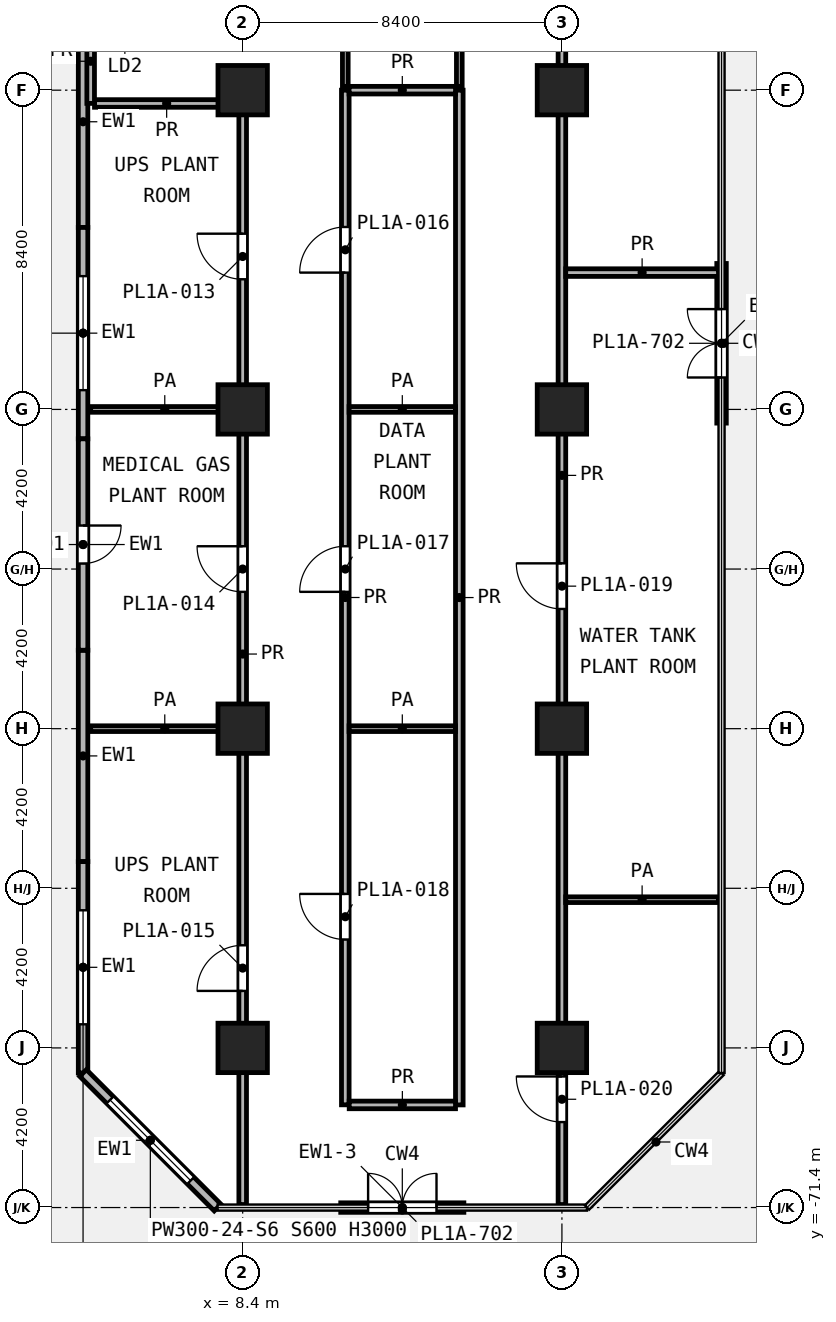
"""IFC4 building model, lengths in metres.
Left out: names, types, materials, properties, quantities, classifications, styles, units other than length and angle.
Written with IfcOpenShell. Run it as: python <this file> out.ifc"""

import sys

from ifc_helpers import new_model, si_unit, direction, frame, frame_2d, origin, origin_2d, place, context, subcontext, project, spatial, rectangle, extrude, element, fill, save


model = new_model("IFC4")
c1 = context("Model", 3, precision=1e-05, world=origin(), true_north=direction((0.0, 1.0)))
c2 = subcontext(c1, "Body", "Model", "MODEL_VIEW")
j1 = project(units=[si_unit("LENGTHUNIT", "METRE"), si_unit("PLANEANGLEUNIT", "RADIAN")], contexts=[c1])
p1 = place(None, origin())
s1 = spatial("IfcSite", under=j1, at=p1, CompositionType="ELEMENT")
p2 = place(p1, origin())
s2 = spatial("IfcBuilding", under=s1, at=p2, CompositionType="ELEMENT")
p3 = place(p2, frame((0.0, 0.0, 34.2)))
s3 = spatial("IfcBuildingStorey", under=s2, at=p3, CompositionType="ELEMENT", Elevation=34.2)
for number, where, z_axis, x_axis in (
    (1, (8.4, -42.0, 0.0), (0.0, 0.0, 1.0), (1.0, 0.0, 0.0)),
    (2, (16.8, -42.0, 0.0), (0.0, 0.0, 1.0), (1.0, 0.0, 0.0)),
    (3, (8.4, -50.4, 0.0), (0.0, 0.0, 1.0), (1.0, 0.0, 0.0)),
    (4, (16.8, -50.4, 0.0), (0.0, 0.0, 1.0), (1.0, 0.0, 0.0)),
    (5, (8.4, -58.8, 0.0), (0.0, 0.0, 1.0), (1.0, 0.0, 0.0)),
    (6, (16.8, -58.8, 0.0), (0.0, 0.0, 1.0), (1.0, 0.0, 0.0)),
    (7, (8.4, -67.2, 0.0), (0.0, 0.0, 1.0), (1.0, 0.0, 0.0)),
    (8, (16.8, -67.2, 0.0), (0.0, 0.0, 1.0), (1.0, 0.0, 0.0)),
):
    element("IfcColumn", number, at=place(p3, frame(where, z_axis=z_axis, x_axis=x_axis)), inside=s3, PredefinedType="COLUMN", context=c2, shape_type="SweptSolid", body=[
        extrude(rectangle(XDim=1.3, YDim=1.3, at=origin_2d()), origin(), (0.0, 0.0, 1.0), 5.0),
    ])
p4 = place(p3, frame((4.2, -40.05, 0.0), z_axis=(0.0, 0.0, 1.0), x_axis=(0.0, -1.0, 0.0)))
e9 = element("IfcWall", 9, at=p4, inside=s3, PredefinedType="SOLIDWALL", context=c2, shape_type="SweptSolid", body=[
    extrude(rectangle(XDim=5.562, YDim=0.25, at=frame_2d((2.781, 0.0))), origin(), (0.0, 0.0, 1.0), 4.58),
])
p5 = place(p3, frame((4.2, -45.612, 0.0), z_axis=(0.0, 0.0, 1.0), x_axis=(0.0, -1.0, 0.0)))
e10 = element("IfcWall", 10, at=p5, inside=s3, PredefinedType="SOLIDWALL", context=c2, shape_type="SweptSolid", body=[
    extrude(rectangle(XDim=5.562, YDim=0.25, at=frame_2d((2.781, 0.0))), origin(), (0.0, 0.0, 1.0), 4.58),
])
p6 = place(p5, frame((1.281, 0.0, 0.6)))
e11 = element("IfcOpeningElement", 11, at=p6, cuts=e10, PredefinedType="OPENING", context=c2, shape_type="SweptSolid", body=[
    extrude(rectangle(XDim=3.0, YDim=2.4, at=frame_2d((1.5, 1.2))), frame((0.0, 0.135, 0.0), z_axis=(0.0, -1.0, 0.0), x_axis=(1.0, 0.0, 0.0)), (0.0, 0.0, 1.0), 0.27),
])
p7 = place(p3, frame((4.2, -51.174, 0.0), z_axis=(0.0, 0.0, 1.0), x_axis=(0.0, -1.0, 0.0)))
e12 = element("IfcWall", 12, at=p7, inside=s3, PredefinedType="SOLIDWALL", context=c2, shape_type="SweptSolid", body=[
    extrude(rectangle(XDim=5.562, YDim=0.25, at=frame_2d((2.781, 0.0))), origin(), (0.0, 0.0, 1.0), 4.58),
])
p8 = place(p7, frame((2.281, 0.0, 0.0)))
e13 = element("IfcOpeningElement", 13, at=p8, cuts=e12, PredefinedType="OPENING", context=c2, shape_type="SweptSolid", body=[
    extrude(rectangle(XDim=1.0, YDim=2.1, at=frame_2d((0.5, 1.05))), frame((0.0, 0.135, 0.0), z_axis=(0.0, -1.0, 0.0), x_axis=(1.0, 0.0, 0.0)), (0.0, 0.0, 1.0), 0.27),
])
p9 = place(p3, frame((4.2, -56.736, 0.0), z_axis=(0.0, 0.0, 1.0), x_axis=(0.0, -1.0, 0.0)))
e14 = element("IfcWall", 14, at=p9, inside=s3, PredefinedType="SOLIDWALL", context=c2, shape_type="SweptSolid", body=[
    extrude(rectangle(XDim=5.562, YDim=0.25, at=frame_2d((2.781, 0.0))), origin(), (0.0, 0.0, 1.0), 4.58),
])
p10 = place(p3, frame((4.2, -62.298, 0.0), z_axis=(0.0, 0.0, 1.0), x_axis=(0.0, -1.0, 0.0)))
e15 = element("IfcWall", 15, at=p10, inside=s3, PredefinedType="SOLIDWALL", context=c2, shape_type="SweptSolid", body=[
    extrude(rectangle(XDim=5.562, YDim=0.25, at=frame_2d((2.781, 0.0))), origin(), (0.0, 0.0, 1.0), 4.58),
])
p11 = place(p10, frame((1.281, 0.0, 0.6)))
e16 = element("IfcOpeningElement", 16, at=p11, cuts=e15, PredefinedType="OPENING", context=c2, shape_type="SweptSolid", body=[
    extrude(rectangle(XDim=3.0, YDim=2.4, at=frame_2d((1.5, 1.2))), frame((0.0, 0.135, 0.0), z_axis=(0.0, -1.0, 0.0), x_axis=(1.0, 0.0, 0.0)), (0.0, 0.0, 1.0), 0.27),
])
p12 = place(p3, frame((4.2, -67.86, 0.0), z_axis=(0.0, 0.0, 1.0), x_axis=(0.707131164599, -0.707082396933, 0.0)))
e17 = element("IfcWall", 17, at=p12, inside=s3, PredefinedType="SOLIDWALL", context=c2, shape_type="SweptSolid", body=[
    extrude(rectangle(XDim=5.006, YDim=0.25, at=frame_2d((2.503, 0.0))), origin(), (0.0, 0.0, 1.0), 4.58),
])
p13 = place(p12, frame((1.003, 0.0, 0.6)))
e18 = element("IfcOpeningElement", 18, at=p13, cuts=e17, PredefinedType="OPENING", context=c2, shape_type="SweptSolid", body=[
    extrude(rectangle(XDim=3.0, YDim=2.4, at=frame_2d((1.5, 1.2))), frame((0.0, 0.135, 0.0), z_axis=(0.0, -1.0, 0.0), x_axis=(1.0, 0.0, 0.0)), (0.0, 0.0, 1.0), 0.27),
])
p14 = place(p3, frame((10.98, -71.401, 0.0), z_axis=(0.0, 0.0, 1.0), x_axis=(1.0, 0.0, 0.0)))
e19 = element("IfcWall", 19, at=p14, inside=s3, PredefinedType="SOLIDWALL", context=c2, shape_type="SweptSolid", body=[
    extrude(rectangle(XDim=3.24, YDim=0.25, at=frame_2d((1.62, 0.0))), origin(), (0.0, 0.0, 1.0), 4.42),
])
p15 = place(p14, frame((0.72, 0.0, 0.0)))
e20 = element("IfcOpeningElement", 20, at=p15, cuts=e19, PredefinedType="OPENING", context=c2, shape_type="SweptSolid", body=[
    extrude(rectangle(XDim=1.8, YDim=2.1, at=frame_2d((0.9, 1.05))), frame((0.0, 0.135, 0.0), z_axis=(0.0, -1.0, 0.0), x_axis=(1.0, 0.0, 0.0)), (0.0, 0.0, 1.0), 0.27),
])
p16 = place(p3, frame((21.0, -50.76, 0.0), z_axis=(0.0, 0.0, 1.0), x_axis=(0.0, 1.0, 0.0)))
e21 = element("IfcWall", 21, at=p16, inside=s3, PredefinedType="SOLIDWALL", context=c2, shape_type="SweptSolid", body=[
    extrude(rectangle(XDim=4.2, YDim=0.25, at=frame_2d((2.1, 0.0))), origin(), (0.0, 0.0, 1.0), 4.42),
])
p17 = place(p16, frame((1.2, 0.0, 0.0)))
e22 = element("IfcOpeningElement", 22, at=p17, cuts=e21, PredefinedType="OPENING", context=c2, shape_type="SweptSolid", body=[
    extrude(rectangle(XDim=1.8, YDim=2.1, at=frame_2d((0.9, 1.05))), frame((0.0, 0.135, 0.0), z_axis=(0.0, -1.0, 0.0), x_axis=(1.0, 0.0, 0.0)), (0.0, 0.0, 1.0), 0.27),
])
p18 = place(p3, frame((16.9, -63.3, 0.0), z_axis=(0.0, 0.0, 1.0), x_axis=(1.0, 0.0, 0.0)))
e23 = element("IfcWall", 23, at=p18, inside=s3, PredefinedType="PARTITIONING", context=c2, shape_type="SweptSolid", body=[
    extrude(rectangle(XDim=4.02, YDim=0.15, at=frame_2d((2.01, 0.0))), origin(), (0.0, 0.0, 1.0), 4.58),
])
p19 = place(p3, frame((4.4, -58.8, 0.0), z_axis=(0.0, 0.0, 1.0), x_axis=(1.0, 0.0, 0.0)))
e24 = element("IfcWall", 24, at=p19, inside=s3, PredefinedType="PARTITIONING", context=c2, shape_type="SweptSolid", body=[
    extrude(rectangle(XDim=3.9, YDim=0.15, at=frame_2d((1.95, 0.0))), origin(), (0.0, 0.0, 1.0), 4.58),
])
p20 = place(p3, frame((11.2, -58.8, 0.0), z_axis=(0.0, 0.0, 1.0), x_axis=(1.0, 0.0, 0.0)))
e25 = element("IfcWall", 25, at=p20, inside=s3, PredefinedType="PARTITIONING", context=c2, shape_type="SweptSolid", body=[
    extrude(rectangle(XDim=2.8, YDim=0.15, at=frame_2d((1.4, 0.0))), origin(), (0.0, 0.0, 1.0), 4.58),
])
p21 = place(p3, frame((4.4, -50.4, 0.0), z_axis=(0.0, 0.0, 1.0), x_axis=(1.0, 0.0, 0.0)))
e26 = element("IfcWall", 26, at=p21, inside=s3, PredefinedType="PARTITIONING", context=c2, shape_type="SweptSolid", body=[
    extrude(rectangle(XDim=3.9, YDim=0.15, at=frame_2d((1.95, 0.0))), origin(), (0.0, 0.0, 1.0), 4.58),
])
p22 = place(p3, frame((11.2, -50.4, 0.0), z_axis=(0.0, 0.0, 1.0), x_axis=(1.0, 0.0, 0.0)))
e27 = element("IfcWall", 27, at=p22, inside=s3, PredefinedType="PARTITIONING", context=c2, shape_type="SweptSolid", body=[
    extrude(rectangle(XDim=2.8, YDim=0.15, at=frame_2d((1.4, 0.0))), origin(), (0.0, 0.0, 1.0), 4.58),
])
p23 = place(p3, frame((11.1, -41.9, 0.0), z_axis=(0.0, 0.0, 1.0), x_axis=(0.0, 1.0, 0.0)))
e28 = element("IfcWall", 28, at=p23, inside=s3, PredefinedType="PARTITIONING", context=c2, shape_type="SweptSolid", body=[
    extrude(rectangle(XDim=12.497, YDim=0.15, at=frame_2d((6.249, 0.0))), origin(), (0.0, 0.0, 1.0), 4.58),
])
p24 = place(p23, frame((5.699, 0.0, 0.0)))
e29 = element("IfcOpeningElement", 29, at=p24, cuts=e28, PredefinedType="OPENING", context=c2, shape_type="SweptSolid", body=[
    extrude(rectangle(XDim=1.0, YDim=2.1, at=frame_2d((0.5, 1.05))), frame((0.0, 0.085, 0.0), z_axis=(0.0, -1.0, 0.0), x_axis=(1.0, 0.0, 0.0)), (0.0, 0.0, 1.0), 0.17),
])
p25 = place(p3, frame((14.1, -41.9, 0.0), z_axis=(0.0, 0.0, 1.0), x_axis=(0.0, 1.0, 0.0)))
e30 = element("IfcWall", 30, at=p25, inside=s3, PredefinedType="PARTITIONING", context=c2, shape_type="SweptSolid", body=[
    extrude(rectangle(XDim=12.5, YDim=0.15, at=frame_2d((6.25, 0.0))), origin(), (0.0, 0.0, 1.0), 4.58),
])
p26 = place(p3, frame((11.203, -68.7, 0.0), z_axis=(0.0, 0.0, 1.0), x_axis=(1.0, 0.0, 0.0)))
e31 = element("IfcWall", 31, at=p26, inside=s3, PredefinedType="PARTITIONING", context=c2, shape_type="SweptSolid", body=[
    extrude(rectangle(XDim=2.797, YDim=0.2, at=frame_2d((1.398, 0.0))), origin(), (0.0, 0.0, 1.0), 4.58),
])
p27 = place(p3, frame((16.9, -46.8, 0.0), z_axis=(0.0, 0.0, 1.0), x_axis=(1.0, 0.0, 0.0)))
e32 = element("IfcWall", 32, at=p27, inside=s3, PredefinedType="PARTITIONING", context=c2, shape_type="SweptSolid", body=[
    extrude(rectangle(XDim=4.02, YDim=0.2, at=frame_2d((2.01, 0.0))), origin(), (0.0, 0.0, 1.0), 4.58),
])
p28 = place(p3, frame((4.501, -42.35, 0.0), z_axis=(0.0, 0.0, 1.0), x_axis=(1.0, 0.0, 0.0)))
e33 = element("IfcWall", 33, at=p28, inside=s3, PredefinedType="PARTITIONING", context=c2, shape_type="SweptSolid", body=[
    extrude(rectangle(XDim=3.797, YDim=0.2, at=frame_2d((1.898, 0.0))), origin(), (0.0, 0.0, 1.0), 4.58),
])
p29 = place(p3, frame((11.2, -42.0, 0.0), z_axis=(0.0, 0.0, 1.0), x_axis=(1.0, 0.0, 0.0)))
e34 = element("IfcWall", 34, at=p29, inside=s3, PredefinedType="PARTITIONING", context=c2, shape_type="SweptSolid", body=[
    extrude(rectangle(XDim=2.8, YDim=0.2, at=frame_2d((1.4, 0.0))), origin(), (0.0, 0.0, 1.0), 4.58),
])
p30 = place(p3, frame((4.4, -42.348, 0.0), z_axis=(0.0, 0.0, 1.0), x_axis=(0.0, 1.0, 0.0)))
e35 = element("IfcWall", 35, at=p30, inside=s3, PredefinedType="PARTITIONING", context=c2, shape_type="SweptSolid", body=[
    extrude(rectangle(XDim=2.218, YDim=0.2, at=frame_2d((1.109, 0.0))), origin(), (0.0, 0.0, 1.0), 4.58),
])
p31 = place(p3, frame((8.4, -71.321, 0.0), z_axis=(0.0, 0.0, 1.0), x_axis=(0.0, 1.0, 0.0)))
e36 = element("IfcWall", 36, at=p31, inside=s3, PredefinedType="PARTITIONING", context=c2, shape_type="SweptSolid", body=[
    extrude(rectangle(XDim=28.969, YDim=0.2, at=frame_2d((14.484, 0.0))), origin(), (0.0, 0.0, 1.0), 4.58),
])
p32 = place(p31, frame((24.345, 0.0, 0.0)))
e37 = element("IfcOpeningElement", 37, at=p32, cuts=e36, PredefinedType="OPENING", context=c2, shape_type="SweptSolid", body=[
    extrude(rectangle(XDim=1.2, YDim=2.1, at=frame_2d((0.6, 1.05))), frame((0.0, 0.11, 0.0), z_axis=(0.0, -1.0, 0.0), x_axis=(1.0, 0.0, 0.0)), (0.0, 0.0, 1.0), 0.22),
])
p33 = place(p31, frame((16.121, 0.0, 0.0)))
e38 = element("IfcOpeningElement", 38, at=p33, cuts=e36, PredefinedType="OPENING", context=c2, shape_type="SweptSolid", body=[
    extrude(rectangle(XDim=1.2, YDim=2.1, at=frame_2d((0.6, 1.05))), frame((0.0, 0.11, 0.0), z_axis=(0.0, -1.0, 0.0), x_axis=(1.0, 0.0, 0.0)), (0.0, 0.0, 1.0), 0.22),
])
p34 = place(p31, frame((5.621, 0.0, 0.0)))
e39 = element("IfcOpeningElement", 39, at=p34, cuts=e36, PredefinedType="OPENING", context=c2, shape_type="SweptSolid", body=[
    extrude(rectangle(XDim=1.2, YDim=2.1, at=frame_2d((0.6, 1.05))), frame((0.0, 0.11, 0.0), z_axis=(0.0, -1.0, 0.0), x_axis=(1.0, 0.0, 0.0)), (0.0, 0.0, 1.0), 0.22),
])
p35 = place(p3, frame((11.1, -68.697, 0.0), z_axis=(0.0, 0.0, 1.0), x_axis=(0.0, 1.0, 0.0)))
e40 = element("IfcWall", 40, at=p35, inside=s3, PredefinedType="PARTITIONING", context=c2, shape_type="SweptSolid", body=[
    extrude(rectangle(XDim=26.697, YDim=0.2, at=frame_2d((13.349, 0.0))), origin(), (0.0, 0.0, 1.0), 4.58),
])
p36 = place(p35, frame((21.897, 0.0, 0.0)))
e41 = element("IfcOpeningElement", 41, at=p36, cuts=e40, PredefinedType="OPENING", context=c2, shape_type="SweptSolid", body=[
    extrude(rectangle(XDim=1.2, YDim=2.1, at=frame_2d((0.6, 1.05))), frame((0.0, 0.11, 0.0), z_axis=(0.0, -1.0, 0.0), x_axis=(1.0, 0.0, 0.0)), (0.0, 0.0, 1.0), 0.22),
])
p37 = place(p35, frame((13.497, 0.0, 0.0)))
e42 = element("IfcOpeningElement", 42, at=p37, cuts=e40, PredefinedType="OPENING", context=c2, shape_type="SweptSolid", body=[
    extrude(rectangle(XDim=1.2, YDim=2.1, at=frame_2d((0.6, 1.05))), frame((0.0, 0.11, 0.0), z_axis=(0.0, -1.0, 0.0), x_axis=(1.0, 0.0, 0.0)), (0.0, 0.0, 1.0), 0.22),
])
p38 = place(p35, frame((4.349, 0.0, 0.0)))
e43 = element("IfcOpeningElement", 43, at=p38, cuts=e40, PredefinedType="OPENING", context=c2, shape_type="SweptSolid", body=[
    extrude(rectangle(XDim=1.2, YDim=2.1, at=frame_2d((0.6, 1.05))), frame((0.0, 0.11, 0.0), z_axis=(0.0, -1.0, 0.0), x_axis=(1.0, 0.0, 0.0)), (0.0, 0.0, 1.0), 0.22),
])
p39 = place(p3, frame((14.1, -68.7, 0.0), z_axis=(0.0, 0.0, 1.0), x_axis=(0.0, 1.0, 0.0)))
e44 = element("IfcWall", 44, at=p39, inside=s3, PredefinedType="PARTITIONING", context=c2, shape_type="SweptSolid", body=[
    extrude(rectangle(XDim=26.7, YDim=0.2, at=frame_2d((13.35, 0.0))), origin(), (0.0, 0.0, 1.0), 4.58),
])
p40 = place(p3, frame((16.8, -71.321, 0.0), z_axis=(0.0, 0.0, 1.0), x_axis=(0.0, 1.0, 0.0)))
e45 = element("IfcWall", 45, at=p40, inside=s3, PredefinedType="PARTITIONING", context=c2, shape_type="SweptSolid", body=[
    extrude(rectangle(XDim=38.371, YDim=0.2, at=frame_2d((19.186, 0.0))), origin(), (0.0, 0.0, 1.0), 4.58),
])
p41 = place(p40, frame((32.621, 0.0, 0.0)))
e46 = element("IfcOpeningElement", 46, at=p41, cuts=e45, PredefinedType="OPENING", context=c2, shape_type="SweptSolid", body=[
    extrude(rectangle(XDim=1.2, YDim=2.1, at=frame_2d((0.6, 1.05))), frame((0.0, 0.11, 0.0), z_axis=(0.0, -1.0, 0.0), x_axis=(1.0, 0.0, 0.0)), (0.0, 0.0, 1.0), 0.22),
])
p42 = place(p40, frame((15.671, 0.0, 0.0)))
e47 = element("IfcOpeningElement", 47, at=p42, cuts=e45, PredefinedType="OPENING", context=c2, shape_type="SweptSolid", body=[
    extrude(rectangle(XDim=1.2, YDim=2.1, at=frame_2d((0.6, 1.05))), frame((0.0, 0.11, 0.0), z_axis=(0.0, -1.0, 0.0), x_axis=(1.0, 0.0, 0.0)), (0.0, 0.0, 1.0), 0.22),
])
p43 = place(p40, frame((2.17, 0.0, 0.0)))
e48 = element("IfcOpeningElement", 48, at=p43, cuts=e45, PredefinedType="OPENING", context=c2, shape_type="SweptSolid", body=[
    extrude(rectangle(XDim=1.2, YDim=2.1, at=frame_2d((0.6, 1.05))), frame((0.0, 0.11, 0.0), z_axis=(0.0, -1.0, 0.0), x_axis=(1.0, 0.0, 0.0)), (0.0, 0.0, 1.0), 0.22),
])
p44 = place(p6, origin())
e49 = element("IfcWindow", 49, at=p44, inside=s3, PartitioningType="SINGLE_PANEL", PredefinedType="WINDOW", context=c2, shape_type="SweptSolid", body=[
    extrude(rectangle(XDim=3.0, YDim=2.4, at=frame_2d((1.5, 1.2))), frame((0.0, 0.03, 0.0), z_axis=(0.0, -1.0, 0.0), x_axis=(1.0, 0.0, 0.0)), (0.0, 0.0, 1.0), 0.06),
])
fill(e11, e49)
p45 = place(p8, origin())
e50 = element("IfcDoor", 50, at=p45, inside=s3, OperationType="SINGLE_SWING_LEFT", PredefinedType="DOOR", context=c2, shape_type="SweptSolid", body=[
    extrude(rectangle(XDim=1.0, YDim=2.1, at=frame_2d((0.5, 1.05))), frame((0.0, 0.025, 0.0), z_axis=(0.0, -1.0, 0.0), x_axis=(1.0, 0.0, 0.0)), (0.0, 0.0, 1.0), 0.05),
])
fill(e13, e50)
p46 = place(p11, origin())
e51 = element("IfcWindow", 51, at=p46, inside=s3, PartitioningType="SINGLE_PANEL", PredefinedType="WINDOW", context=c2, shape_type="SweptSolid", body=[
    extrude(rectangle(XDim=3.0, YDim=2.4, at=frame_2d((1.5, 1.2))), frame((0.0, 0.03, 0.0), z_axis=(0.0, -1.0, 0.0), x_axis=(1.0, 0.0, 0.0)), (0.0, 0.0, 1.0), 0.06),
])
fill(e16, e51)
p47 = place(p13, origin())
e52 = element("IfcWindow", 52, at=p47, inside=s3, PartitioningType="SINGLE_PANEL", PredefinedType="WINDOW", context=c2, shape_type="SweptSolid", body=[
    extrude(rectangle(XDim=3.0, YDim=2.4, at=frame_2d((1.5, 1.2))), frame((0.0, 0.03, 0.0), z_axis=(0.0, -1.0, 0.0), x_axis=(1.0, 0.0, 0.0)), (0.0, 0.0, 1.0), 0.06),
])
fill(e18, e52)
p48 = place(p15, origin())
e53 = element("IfcDoor", 53, at=p48, inside=s3, OperationType="DOUBLE_DOOR_SINGLE_SWING", PredefinedType="DOOR", context=c2, shape_type="SweptSolid", body=[
    extrude(rectangle(XDim=1.8, YDim=2.1, at=frame_2d((0.9, 1.05))), frame((0.0, 0.025, 0.0), z_axis=(0.0, -1.0, 0.0), x_axis=(1.0, 0.0, 0.0)), (0.0, 0.0, 1.0), 0.05),
])
fill(e20, e53)
p49 = place(p17, origin())
e54 = element("IfcDoor", 54, at=p49, inside=s3, OperationType="DOUBLE_DOOR_SINGLE_SWING", PredefinedType="DOOR", context=c2, shape_type="SweptSolid", body=[
    extrude(rectangle(XDim=1.8, YDim=2.1, at=frame_2d((0.9, 1.05))), frame((0.0, 0.025, 0.0), z_axis=(0.0, -1.0, 0.0), x_axis=(1.0, 0.0, 0.0)), (0.0, 0.0, 1.0), 0.05),
])
fill(e22, e54)
p50 = place(p32, origin())
e55 = element("IfcDoor", 55, at=p50, inside=s3, OperationType="SINGLE_SWING_RIGHT", PredefinedType="DOOR", context=c2, shape_type="SweptSolid", body=[
    extrude(rectangle(XDim=1.2, YDim=2.1, at=frame_2d((0.6, 1.05))), frame((0.0, 0.025, 0.0), z_axis=(0.0, -1.0, 0.0), x_axis=(1.0, 0.0, 0.0)), (0.0, 0.0, 1.0), 0.05),
])
fill(e37, e55)
p51 = place(p33, origin())
e56 = element("IfcDoor", 56, at=p51, inside=s3, OperationType="SINGLE_SWING_RIGHT", PredefinedType="DOOR", context=c2, shape_type="SweptSolid", body=[
    extrude(rectangle(XDim=1.2, YDim=2.1, at=frame_2d((0.6, 1.05))), frame((0.0, 0.025, 0.0), z_axis=(0.0, -1.0, 0.0), x_axis=(1.0, 0.0, 0.0)), (0.0, 0.0, 1.0), 0.05),
])
fill(e38, e56)
p52 = place(p34, origin())
e57 = element("IfcDoor", 57, at=p52, inside=s3, OperationType="SINGLE_SWING_LEFT", PredefinedType="DOOR", context=c2, shape_type="SweptSolid", body=[
    extrude(rectangle(XDim=1.2, YDim=2.1, at=frame_2d((0.6, 1.05))), frame((0.0, 0.025, 0.0), z_axis=(0.0, -1.0, 0.0), x_axis=(1.0, 0.0, 0.0)), (0.0, 0.0, 1.0), 0.05),
])
fill(e39, e57)
p53 = place(p36, origin())
e58 = element("IfcDoor", 58, at=p53, inside=s3, OperationType="SINGLE_SWING_LEFT", PredefinedType="DOOR", context=c2, shape_type="SweptSolid", body=[
    extrude(rectangle(XDim=1.2, YDim=2.1, at=frame_2d((0.6, 1.05))), frame((0.0, 0.025, 0.0), z_axis=(0.0, -1.0, 0.0), x_axis=(1.0, 0.0, 0.0)), (0.0, 0.0, 1.0), 0.05),
])
fill(e41, e58)
p54 = place(p37, origin())
e59 = element("IfcDoor", 59, at=p54, inside=s3, OperationType="SINGLE_SWING_LEFT", PredefinedType="DOOR", context=c2, shape_type="SweptSolid", body=[
    extrude(rectangle(XDim=1.2, YDim=2.1, at=frame_2d((0.6, 1.05))), frame((0.0, 0.025, 0.0), z_axis=(0.0, -1.0, 0.0), x_axis=(1.0, 0.0, 0.0)), (0.0, 0.0, 1.0), 0.05),
])
fill(e42, e59)
p55 = place(p38, origin())
e60 = element("IfcDoor", 60, at=p55, inside=s3, OperationType="SINGLE_SWING_RIGHT", PredefinedType="DOOR", context=c2, shape_type="SweptSolid", body=[
    extrude(rectangle(XDim=1.2, YDim=2.1, at=frame_2d((0.6, 1.05))), frame((0.0, 0.025, 0.0), z_axis=(0.0, -1.0, 0.0), x_axis=(1.0, 0.0, 0.0)), (0.0, 0.0, 1.0), 0.05),
])
fill(e43, e60)
p56 = place(p42, origin())
e61 = element("IfcDoor", 61, at=p56, inside=s3, OperationType="SINGLE_SWING_RIGHT", PredefinedType="DOOR", context=c2, shape_type="SweptSolid", body=[
    extrude(rectangle(XDim=1.2, YDim=2.1, at=frame_2d((0.6, 1.05))), frame((0.0, 0.025, 0.0), z_axis=(0.0, -1.0, 0.0), x_axis=(1.0, 0.0, 0.0)), (0.0, 0.0, 1.0), 0.05),
])
fill(e47, e61)
p57 = place(p43, origin())
e62 = element("IfcDoor", 62, at=p57, inside=s3, OperationType="SINGLE_SWING_RIGHT", PredefinedType="DOOR", context=c2, shape_type="SweptSolid", body=[
    extrude(rectangle(XDim=1.2, YDim=2.1, at=frame_2d((0.6, 1.05))), frame((0.0, 0.025, 0.0), z_axis=(0.0, -1.0, 0.0), x_axis=(1.0, 0.0, 0.0)), (0.0, 0.0, 1.0), 0.05),
])
fill(e48, e62)
save(model, sys.argv[1])
